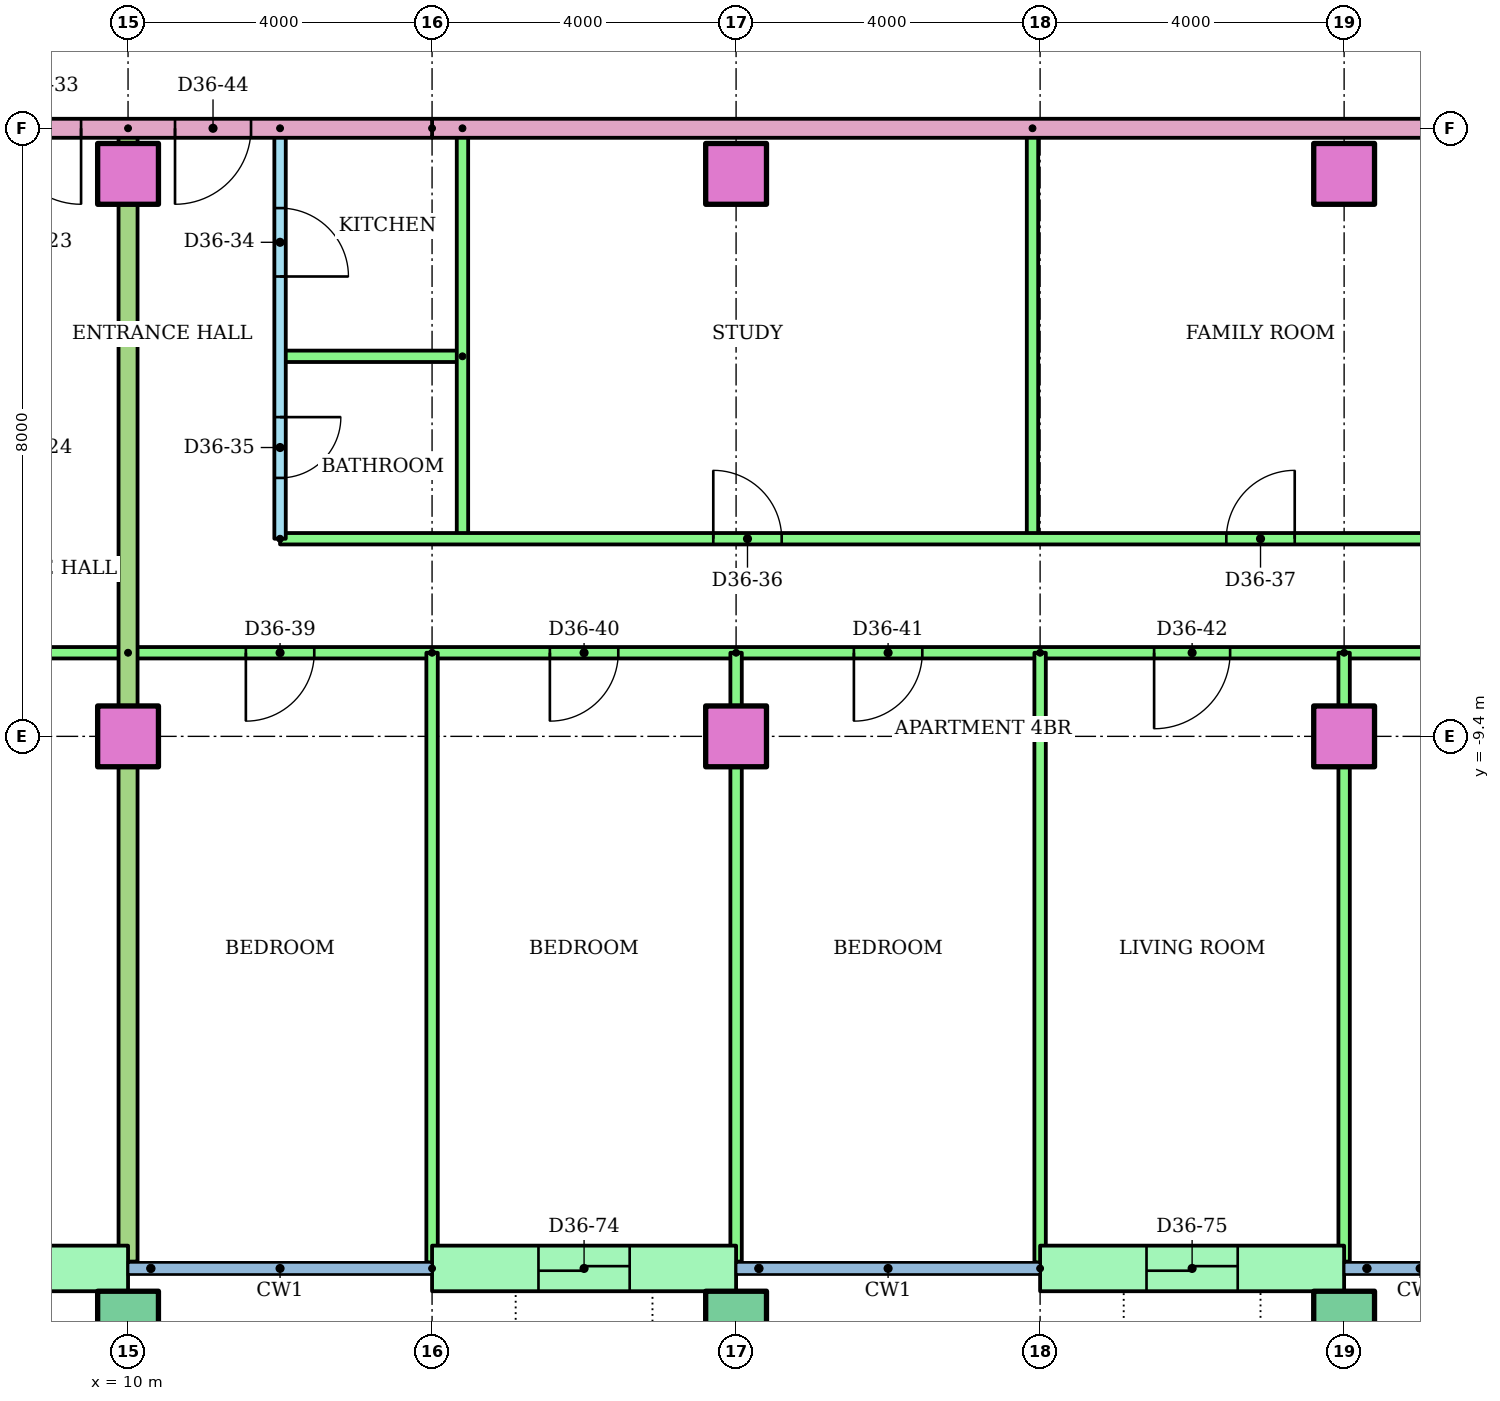
"""IFC4 building model, lengths in metres.
Left out: names, types, materials, properties, quantities, classifications, styles, units other than length and angle.
Written with IfcOpenShell. Run it as: python <this file> out.ifc"""

import sys

from ifc_helpers import new_model, si_unit, direction, frame, frame_2d, origin, origin_2d, place, context, subcontext, project, spatial, rectangle, hollow_rectangle, extrude, element, fill, save


model = new_model("IFC4")
c1 = context("Model", 3, precision=1e-05, world=origin(), true_north=direction((0.0, 1.0)))
c2 = subcontext(c1, "Body", "Model", "MODEL_VIEW")
j1 = project(units=[si_unit("LENGTHUNIT", "METRE"), si_unit("PLANEANGLEUNIT", "RADIAN")], contexts=[c1])
p1 = place(None, origin())
s1 = spatial("IfcSite", under=j1, at=p1, CompositionType="ELEMENT")
p2 = place(p1, origin())
s2 = spatial("IfcBuilding", under=s1, at=p2, CompositionType="ELEMENT")
p3 = place(p2, frame((0.0, 0.0, 139.0)))
s3 = spatial("IfcBuildingStorey", under=s2, at=p3, CompositionType="ELEMENT", Elevation=139.0)
for number, where in (
    (1, (10.0, -17.1, 0.0)),
    (2, (18.0, -17.1, 0.0)),
    (3, (26.0, -17.1, 0.0)),
):
    element("IfcColumn", number, at=place(p3, frame(where)), inside=s3, PredefinedType="COLUMN", context=c2, shape_type="SweptSolid", body=[
        extrude(hollow_rectangle(XDim=0.8, YDim=0.8, WallThickness=0.04, at=origin_2d()), origin(), (0.0, 0.0, 1.0), 3.2),
    ])
for number, where in (
    (4, (10.0, -9.4, 0.0)),
    (5, (18.0, -9.4, 0.0)),
    (6, (26.0, -9.4, 0.0)),
    (7, (10.0, -2.0, 0.0)),
    (8, (18.0, -2.0, 0.0)),
    (9, (26.0, -2.0, 0.0)),
):
    element("IfcColumn", number, at=place(p3, frame(where)), inside=s3, PredefinedType="COLUMN", context=c2, shape_type="SweptSolid", body=[
        extrude(rectangle(XDim=0.8, YDim=0.8, at=origin_2d()), origin(), (0.0, 0.0, 1.0), 3.2),
    ])
p4 = place(p3, frame((6.0, -16.4, 0.0)))
e10 = element("IfcWall", 10, at=p4, inside=s3, PredefinedType="STANDARD", context=c2, shape_type="SweptSolid", body=[
    extrude(rectangle(XDim=4.0, YDim=0.6, at=frame_2d((2.0, 0.0))), origin(), (0.0, 0.0, 1.0), 2.92),
])
p5 = place(p4, frame((1.4, 0.0, 0.0)))
e11 = element("IfcOpeningElement", 11, at=p5, cuts=e10, PredefinedType="OPENING", context=c2, shape_type="SweptSolid", body=[
    extrude(rectangle(XDim=1.2, YDim=2.1, at=frame_2d((0.6, 1.05))), frame((0.0, 0.31, 0.0), z_axis=(0.0, -1.0, 0.0), x_axis=(1.0, 0.0, 0.0)), (0.0, 0.0, 1.0), 0.62),
])
p6 = place(p3, frame((14.0, -16.4, 0.0)))
e12 = element("IfcWall", 12, at=p6, inside=s3, PredefinedType="STANDARD", context=c2, shape_type="SweptSolid", body=[
    extrude(rectangle(XDim=4.0, YDim=0.6, at=frame_2d((2.0, 0.0))), origin(), (0.0, 0.0, 1.0), 2.92),
])
p7 = place(p6, frame((1.4, 0.0, 0.0)))
e13 = element("IfcOpeningElement", 13, at=p7, cuts=e12, PredefinedType="OPENING", context=c2, shape_type="SweptSolid", body=[
    extrude(rectangle(XDim=1.2, YDim=2.1, at=frame_2d((0.6, 1.05))), frame((0.0, 0.31, 0.0), z_axis=(0.0, -1.0, 0.0), x_axis=(1.0, 0.0, 0.0)), (0.0, 0.0, 1.0), 0.62),
])
p8 = place(p3, frame((22.0, -16.4, 0.0)))
e14 = element("IfcWall", 14, at=p8, inside=s3, PredefinedType="STANDARD", context=c2, shape_type="SweptSolid", body=[
    extrude(rectangle(XDim=4.0, YDim=0.6, at=frame_2d((2.0, 0.0))), origin(), (0.0, 0.0, 1.0), 2.92),
])
p9 = place(p8, frame((1.4, 0.0, 0.0)))
e15 = element("IfcOpeningElement", 15, at=p9, cuts=e14, PredefinedType="OPENING", context=c2, shape_type="SweptSolid", body=[
    extrude(rectangle(XDim=1.2, YDim=2.1, at=frame_2d((0.6, 1.05))), frame((0.0, 0.31, 0.0), z_axis=(0.0, -1.0, 0.0), x_axis=(1.0, 0.0, 0.0)), (0.0, 0.0, 1.0), 0.62),
])
p10 = place(p3, frame((10.0, -8.3, 0.0), z_axis=(0.0, 0.0, 1.0), x_axis=(-1.0, 0.0, 0.0)))
e16 = element("IfcWall", 16, at=p10, inside=s3, PredefinedType="PARTITIONING", context=c2, shape_type="SweptSolid", body=[
    extrude(rectangle(XDim=24.0, YDim=0.15, at=frame_2d((12.0, 0.0))), origin(), (0.0, 0.0, 1.0), 2.4),
])
p11 = place(p10, frame((19.5, 0.0, 0.0)))
e17 = element("IfcOpeningElement", 17, at=p11, cuts=e16, PredefinedType="OPENING", context=c2, shape_type="SweptSolid", body=[
    extrude(rectangle(XDim=1.0, YDim=2.1, at=frame_2d((0.5, 1.05))), frame((0.0, 0.085, 0.0), z_axis=(0.0, -1.0, 0.0), x_axis=(1.0, 0.0, 0.0)), (0.0, 0.0, 1.0), 0.17),
])
p12 = place(p10, frame((13.55, 0.0, 0.0)))
e18 = element("IfcOpeningElement", 18, at=p12, cuts=e16, PredefinedType="OPENING", context=c2, shape_type="SweptSolid", body=[
    extrude(rectangle(XDim=0.9, YDim=2.1, at=frame_2d((0.45, 1.05))), frame((0.0, 0.085, 0.0), z_axis=(0.0, -1.0, 0.0), x_axis=(1.0, 0.0, 0.0)), (0.0, 0.0, 1.0), 0.17),
])
p13 = place(p10, frame((9.55, 0.0, 0.0)))
e19 = element("IfcOpeningElement", 19, at=p13, cuts=e16, PredefinedType="OPENING", context=c2, shape_type="SweptSolid", body=[
    extrude(rectangle(XDim=0.9, YDim=2.1, at=frame_2d((0.45, 1.05))), frame((0.0, 0.085, 0.0), z_axis=(0.0, -1.0, 0.0), x_axis=(1.0, 0.0, 0.0)), (0.0, 0.0, 1.0), 0.17),
])
p14 = place(p10, frame((5.55, 0.0, 0.0)))
e20 = element("IfcOpeningElement", 20, at=p14, cuts=e16, PredefinedType="OPENING", context=c2, shape_type="SweptSolid", body=[
    extrude(rectangle(XDim=0.9, YDim=2.1, at=frame_2d((0.45, 1.05))), frame((0.0, 0.085, 0.0), z_axis=(0.0, -1.0, 0.0), x_axis=(1.0, 0.0, 0.0)), (0.0, 0.0, 1.0), 0.17),
])
p15 = place(p10, frame((1.55, 0.0, 0.0)))
e21 = element("IfcOpeningElement", 21, at=p15, cuts=e16, PredefinedType="OPENING", context=c2, shape_type="SweptSolid", body=[
    extrude(rectangle(XDim=0.9, YDim=2.1, at=frame_2d((0.45, 1.05))), frame((0.0, 0.085, 0.0), z_axis=(0.0, -1.0, 0.0), x_axis=(1.0, 0.0, 0.0)), (0.0, 0.0, 1.0), 0.17),
])
p16 = place(p3, frame((12.0, -1.4, 0.0), z_axis=(0.0, 0.0, 1.0), x_axis=(0.0, -1.0, 0.0)))
e22 = element("IfcWall", 22, at=p16, inside=s3, PredefinedType="PARTITIONING", context=c2, shape_type="SweptSolid", body=[
    extrude(rectangle(XDim=5.4, YDim=0.15, at=frame_2d((2.7, 0.0))), origin(), (0.0, 0.0, 1.0), 2.4),
])
p17 = place(p16, frame((1.05, 0.0, 0.0)))
e23 = element("IfcOpeningElement", 23, at=p17, cuts=e22, PredefinedType="OPENING", context=c2, shape_type="SweptSolid", body=[
    extrude(rectangle(XDim=0.9, YDim=2.1, at=frame_2d((0.45, 1.05))), frame((0.0, 0.085, 0.0), z_axis=(0.0, -1.0, 0.0), x_axis=(1.0, 0.0, 0.0)), (0.0, 0.0, 1.0), 0.17),
])
p18 = place(p16, frame((3.8, 0.0, 0.0)))
e24 = element("IfcOpeningElement", 24, at=p18, cuts=e22, PredefinedType="OPENING", context=c2, shape_type="SweptSolid", body=[
    extrude(rectangle(XDim=0.8, YDim=2.1, at=frame_2d((0.4, 1.05))), frame((0.0, 0.085, 0.0), z_axis=(0.0, -1.0, 0.0), x_axis=(1.0, 0.0, 0.0)), (0.0, 0.0, 1.0), 0.17),
])
p19 = place(p3, frame((14.4, -4.4, 0.0), z_axis=(0.0, 0.0, 1.0), x_axis=(-1.0, 0.0, 0.0)))
e25 = element("IfcWall", 25, at=p19, inside=s3, PredefinedType="PARTITIONING", context=c2, shape_type="SweptSolid", body=[
    extrude(rectangle(XDim=2.4, YDim=0.15, at=frame_2d((1.2, 0.0))), origin(), (0.0, 0.0, 1.0), 2.4),
])
for number, where, z_axis, x_axis in (
    (26, (14.4, -1.4, 0.0), (0.0, 0.0, 1.0), (0.0, -1.0, 0.0)),
    (27, (21.9, -1.4, 0.0), (0.0, 0.0, 1.0), (0.0, -1.0, 0.0)),
):
    element("IfcWall", number, at=place(p3, frame(where, z_axis=z_axis, x_axis=x_axis)), inside=s3, PredefinedType="PARTITIONING", context=c2, shape_type="SweptSolid", body=[
        extrude(rectangle(XDim=5.4, YDim=0.15, at=frame_2d((2.7, 0.0))), origin(), (0.0, 0.0, 1.0), 2.4),
    ])
p20 = place(p3, frame((12.0, -6.8, 0.0)))
e28 = element("IfcWall", 28, at=p20, inside=s3, PredefinedType="PARTITIONING", context=c2, shape_type="SweptSolid", body=[
    extrude(rectangle(XDim=20.72, YDim=0.15, at=frame_2d((10.36, 0.0))), origin(), (0.0, 0.0, 1.0), 2.4),
])
p21 = place(p20, frame((5.7, 0.0, 0.0)))
e29 = element("IfcOpeningElement", 29, at=p21, cuts=e28, PredefinedType="OPENING", context=c2, shape_type="SweptSolid", body=[
    extrude(rectangle(XDim=0.9, YDim=2.1, at=frame_2d((0.45, 1.05))), frame((0.0, 0.085, 0.0), z_axis=(0.0, -1.0, 0.0), x_axis=(1.0, 0.0, 0.0)), (0.0, 0.0, 1.0), 0.17),
])
p22 = place(p20, frame((12.45, 0.0, 0.0)))
e30 = element("IfcOpeningElement", 30, at=p22, cuts=e28, PredefinedType="OPENING", context=c2, shape_type="SweptSolid", body=[
    extrude(rectangle(XDim=0.9, YDim=2.1, at=frame_2d((0.45, 1.05))), frame((0.0, 0.085, 0.0), z_axis=(0.0, -1.0, 0.0), x_axis=(1.0, 0.0, 0.0)), (0.0, 0.0, 1.0), 0.17),
])
p23 = place(p20, frame((17.75, 0.0, 0.0)))
e31 = element("IfcOpeningElement", 31, at=p23, cuts=e28, PredefinedType="OPENING", context=c2, shape_type="SweptSolid", body=[
    extrude(rectangle(XDim=0.9, YDim=2.1, at=frame_2d((0.45, 1.05))), frame((0.0, 0.085, 0.0), z_axis=(0.0, -1.0, 0.0), x_axis=(1.0, 0.0, 0.0)), (0.0, 0.0, 1.0), 0.17),
])
p24 = place(p3, frame((32.72, -8.3, 0.0), z_axis=(0.0, 0.0, 1.0), x_axis=(-1.0, 0.0, 0.0)))
e32 = element("IfcWall", 32, at=p24, inside=s3, PredefinedType="PARTITIONING", context=c2, shape_type="SweptSolid", body=[
    extrude(rectangle(XDim=22.72, YDim=0.15, at=frame_2d((11.36, 0.0))), origin(), (0.0, 0.0, 1.0), 2.4),
])
p25 = place(p24, frame((20.27, 0.0, 0.0)))
e33 = element("IfcOpeningElement", 33, at=p25, cuts=e32, PredefinedType="OPENING", context=c2, shape_type="SweptSolid", body=[
    extrude(rectangle(XDim=0.9, YDim=2.1, at=frame_2d((0.45, 1.05))), frame((0.0, 0.085, 0.0), z_axis=(0.0, -1.0, 0.0), x_axis=(1.0, 0.0, 0.0)), (0.0, 0.0, 1.0), 0.17),
])
p26 = place(p24, frame((16.27, 0.0, 0.0)))
e34 = element("IfcOpeningElement", 34, at=p26, cuts=e32, PredefinedType="OPENING", context=c2, shape_type="SweptSolid", body=[
    extrude(rectangle(XDim=0.9, YDim=2.1, at=frame_2d((0.45, 1.05))), frame((0.0, 0.085, 0.0), z_axis=(0.0, -1.0, 0.0), x_axis=(1.0, 0.0, 0.0)), (0.0, 0.0, 1.0), 0.17),
])
p27 = place(p24, frame((12.27, 0.0, 0.0)))
e35 = element("IfcOpeningElement", 35, at=p27, cuts=e32, PredefinedType="OPENING", context=c2, shape_type="SweptSolid", body=[
    extrude(rectangle(XDim=0.9, YDim=2.1, at=frame_2d((0.45, 1.05))), frame((0.0, 0.085, 0.0), z_axis=(0.0, -1.0, 0.0), x_axis=(1.0, 0.0, 0.0)), (0.0, 0.0, 1.0), 0.17),
])
p28 = place(p24, frame((8.22, 0.0, 0.0)))
e36 = element("IfcOpeningElement", 36, at=p28, cuts=e32, PredefinedType="OPENING", context=c2, shape_type="SweptSolid", body=[
    extrude(rectangle(XDim=1.0, YDim=2.1, at=frame_2d((0.5, 1.05))), frame((0.0, 0.085, 0.0), z_axis=(0.0, -1.0, 0.0), x_axis=(1.0, 0.0, 0.0)), (0.0, 0.0, 1.0), 0.17),
])
p29 = place(p24, frame((3.02, 0.0, 0.0)))
e37 = element("IfcOpeningElement", 37, at=p29, cuts=e32, PredefinedType="OPENING", context=c2, shape_type="SweptSolid", body=[
    extrude(rectangle(XDim=0.9, YDim=2.1, at=frame_2d((0.45, 1.05))), frame((0.0, 0.085, 0.0), z_axis=(0.0, -1.0, 0.0), x_axis=(1.0, 0.0, 0.0)), (0.0, 0.0, 1.0), 0.17),
])
p30 = place(p3, frame((14.0, -8.3, 0.0), z_axis=(0.0, 0.0, 1.0), x_axis=(0.0, -1.0, 0.0)))
e38 = element("IfcWall", 38, at=p30, inside=s3, PredefinedType="PARTITIONING", context=c2, shape_type="SweptSolid", body=[
    extrude(rectangle(XDim=8.021, YDim=0.15, at=frame_2d((4.01, 0.0))), origin(), (0.0, 0.0, 1.0), 2.4),
])
p31 = place(p3, frame((18.0, -8.3, 0.0), z_axis=(0.0, 0.0, 1.0), x_axis=(0.0, -1.0, 0.0)))
e39 = element("IfcWall", 39, at=p31, inside=s3, PredefinedType="PARTITIONING", context=c2, shape_type="SweptSolid", body=[
    extrude(rectangle(XDim=8.01, YDim=0.15, at=frame_2d((4.005, 0.0))), origin(), (0.0, 0.0, 1.0), 2.4),
])
p32 = place(p3, frame((22.0, -8.3, 0.0), z_axis=(0.0, 0.0, 1.0), x_axis=(0.0, -1.0, 0.0)))
e40 = element("IfcWall", 40, at=p32, inside=s3, PredefinedType="PARTITIONING", context=c2, shape_type="SweptSolid", body=[
    extrude(rectangle(XDim=8.021, YDim=0.15, at=frame_2d((4.01, 0.0))), origin(), (0.0, 0.0, 1.0), 2.4),
])
p33 = place(p3, frame((26.0, -8.3, 0.0), z_axis=(0.0, 0.0, 1.0), x_axis=(0.0, -1.0, 0.0)))
e41 = element("IfcWall", 41, at=p33, inside=s3, PredefinedType="PARTITIONING", context=c2, shape_type="SweptSolid", body=[
    extrude(rectangle(XDim=8.01, YDim=0.15, at=frame_2d((4.005, 0.0))), origin(), (0.0, 0.0, 1.0), 2.4),
])
p34 = place(p3, frame((10.0, -1.4, 0.0), z_axis=(0.0, 0.0, 1.0), x_axis=(0.0, -1.0, 0.0)))
e42 = element("IfcWall", 42, at=p34, inside=s3, PredefinedType="PARTITIONING", context=c2, shape_type="SweptSolid", body=[
    extrude(rectangle(XDim=14.91, YDim=0.25, at=frame_2d((7.455, 0.0))), origin(), (0.0, 0.0, 1.0), 2.4),
])
p35 = place(p3, frame((29.0, -1.4, 0.0), z_axis=(0.0, 0.0, 1.0), x_axis=(-1.0, 0.0, 0.0)))
e43 = element("IfcWall", 43, at=p35, inside=s3, PredefinedType="PARTITIONING", context=c2, shape_type="SweptSolid", body=[
    extrude(rectangle(XDim=15.0, YDim=0.25, at=frame_2d((7.5, 0.0))), origin(), (0.0, 0.0, 1.0), 2.4),
])
p36 = place(p3, frame((14.0, -1.4, 0.0), z_axis=(0.0, 0.0, 1.0), x_axis=(-1.0, 0.0, 0.0)))
e44 = element("IfcWall", 44, at=p36, inside=s3, PredefinedType="PARTITIONING", context=c2, shape_type="SweptSolid", body=[
    extrude(rectangle(XDim=28.0, YDim=0.25, at=frame_2d((14.0, 0.0))), origin(), (0.0, 0.0, 1.0), 2.4),
])
p37 = place(p36, frame((4.618, 0.0, 0.0)))
e45 = element("IfcOpeningElement", 45, at=p37, cuts=e44, PredefinedType="OPENING", context=c2, shape_type="SweptSolid", body=[
    extrude(rectangle(XDim=1.0, YDim=2.1, at=frame_2d((0.5, 1.05))), frame((0.0, 0.135, 0.0), z_axis=(0.0, -1.0, 0.0), x_axis=(1.0, 0.0, 0.0)), (0.0, 0.0, 1.0), 0.27),
])
p38 = place(p36, frame((2.382, 0.0, 0.0)))
e46 = element("IfcOpeningElement", 46, at=p38, cuts=e44, PredefinedType="OPENING", context=c2, shape_type="SweptSolid", body=[
    extrude(rectangle(XDim=1.0, YDim=2.1, at=frame_2d((0.5, 1.05))), frame((0.0, 0.135, 0.0), z_axis=(0.0, -1.0, 0.0), x_axis=(1.0, 0.0, 0.0)), (0.0, 0.0, 1.0), 0.27),
])
p39 = place(p37, origin())
e47 = element("IfcDoor", 47, at=p39, inside=s3, OperationType="SINGLE_SWING_LEFT", PredefinedType="DOOR", context=c2, shape_type="SweptSolid", body=[
    extrude(rectangle(XDim=1.0, YDim=2.1, at=frame_2d((0.5, 1.05))), frame((0.0, 0.025, 0.0), z_axis=(0.0, -1.0, 0.0), x_axis=(1.0, 0.0, 0.0)), (0.0, 0.0, 1.0), 0.05),
])
fill(e45, e47)
p40 = place(p17, origin())
e48 = element("IfcDoor", 48, at=p40, inside=s3, OperationType="SINGLE_SWING_RIGHT", PredefinedType="DOOR", context=c2, shape_type="SweptSolid", body=[
    extrude(rectangle(XDim=0.9, YDim=2.1, at=frame_2d((0.45, 1.05))), frame((0.0, 0.025, 0.0), z_axis=(0.0, -1.0, 0.0), x_axis=(1.0, 0.0, 0.0)), (0.0, 0.0, 1.0), 0.05),
])
fill(e23, e48)
p41 = place(p18, origin())
e49 = element("IfcDoor", 49, at=p41, inside=s3, OperationType="SINGLE_SWING_LEFT", PredefinedType="DOOR", context=c2, shape_type="SweptSolid", body=[
    extrude(rectangle(XDim=0.8, YDim=2.1, at=frame_2d((0.4, 1.05))), frame((0.0, 0.025, 0.0), z_axis=(0.0, -1.0, 0.0), x_axis=(1.0, 0.0, 0.0)), (0.0, 0.0, 1.0), 0.05),
])
fill(e24, e49)
p42 = place(p21, origin())
e50 = element("IfcDoor", 50, at=p42, inside=s3, OperationType="SINGLE_SWING_LEFT", PredefinedType="DOOR", context=c2, shape_type="SweptSolid", body=[
    extrude(rectangle(XDim=0.9, YDim=2.1, at=frame_2d((0.45, 1.05))), frame((0.0, 0.025, 0.0), z_axis=(0.0, -1.0, 0.0), x_axis=(1.0, 0.0, 0.0)), (0.0, 0.0, 1.0), 0.05),
])
fill(e29, e50)
p43 = place(p22, origin())
e51 = element("IfcDoor", 51, at=p43, inside=s3, OperationType="SINGLE_SWING_RIGHT", PredefinedType="DOOR", context=c2, shape_type="SweptSolid", body=[
    extrude(rectangle(XDim=0.9, YDim=2.1, at=frame_2d((0.45, 1.05))), frame((0.0, 0.025, 0.0), z_axis=(0.0, -1.0, 0.0), x_axis=(1.0, 0.0, 0.0)), (0.0, 0.0, 1.0), 0.05),
])
fill(e30, e51)
p44 = place(p25, origin())
e52 = element("IfcDoor", 52, at=p44, inside=s3, OperationType="SINGLE_SWING_RIGHT", PredefinedType="DOOR", context=c2, shape_type="SweptSolid", body=[
    extrude(rectangle(XDim=0.9, YDim=2.1, at=frame_2d((0.45, 1.05))), frame((0.0, 0.025, 0.0), z_axis=(0.0, -1.0, 0.0), x_axis=(1.0, 0.0, 0.0)), (0.0, 0.0, 1.0), 0.05),
])
fill(e33, e52)
p45 = place(p26, origin())
e53 = element("IfcDoor", 53, at=p45, inside=s3, OperationType="SINGLE_SWING_RIGHT", PredefinedType="DOOR", context=c2, shape_type="SweptSolid", body=[
    extrude(rectangle(XDim=0.9, YDim=2.1, at=frame_2d((0.45, 1.05))), frame((0.0, 0.025, 0.0), z_axis=(0.0, -1.0, 0.0), x_axis=(1.0, 0.0, 0.0)), (0.0, 0.0, 1.0), 0.05),
])
fill(e34, e53)
p46 = place(p27, origin())
e54 = element("IfcDoor", 54, at=p46, inside=s3, OperationType="SINGLE_SWING_RIGHT", PredefinedType="DOOR", context=c2, shape_type="SweptSolid", body=[
    extrude(rectangle(XDim=0.9, YDim=2.1, at=frame_2d((0.45, 1.05))), frame((0.0, 0.025, 0.0), z_axis=(0.0, -1.0, 0.0), x_axis=(1.0, 0.0, 0.0)), (0.0, 0.0, 1.0), 0.05),
])
fill(e35, e54)
p47 = place(p28, origin())
e55 = element("IfcDoor", 55, at=p47, inside=s3, OperationType="SINGLE_SWING_RIGHT", PredefinedType="DOOR", context=c2, shape_type="SweptSolid", body=[
    extrude(rectangle(XDim=1.0, YDim=2.1, at=frame_2d((0.5, 1.05))), frame((0.0, 0.025, 0.0), z_axis=(0.0, -1.0, 0.0), x_axis=(1.0, 0.0, 0.0)), (0.0, 0.0, 1.0), 0.05),
])
fill(e36, e55)
p48 = place(p38, origin())
e56 = element("IfcDoor", 56, at=p48, inside=s3, OperationType="SINGLE_SWING_RIGHT", PredefinedType="DOOR", context=c2, shape_type="SweptSolid", body=[
    extrude(rectangle(XDim=1.0, YDim=2.1, at=frame_2d((0.5, 1.05))), frame((0.0, 0.025, 0.0), z_axis=(0.0, -1.0, 0.0), x_axis=(1.0, 0.0, 0.0)), (0.0, 0.0, 1.0), 0.05),
])
fill(e46, e56)
p49 = place(p7, origin())
e57 = element("IfcDoor", 57, at=p49, inside=s3, OperationType="SLIDING_TO_LEFT", PredefinedType="DOOR", context=c2, shape_type="SweptSolid", body=[
    extrude(rectangle(XDim=1.2, YDim=2.1, at=frame_2d((0.6, 1.05))), frame((0.0, 0.025, 0.0), z_axis=(0.0, -1.0, 0.0), x_axis=(1.0, 0.0, 0.0)), (0.0, 0.0, 1.0), 0.05),
])
fill(e13, e57)
p50 = place(p9, origin())
e58 = element("IfcDoor", 58, at=p50, inside=s3, OperationType="SLIDING_TO_LEFT", PredefinedType="DOOR", context=c2, shape_type="SweptSolid", body=[
    extrude(rectangle(XDim=1.2, YDim=2.1, at=frame_2d((0.6, 1.05))), frame((0.0, 0.025, 0.0), z_axis=(0.0, -1.0, 0.0), x_axis=(1.0, 0.0, 0.0)), (0.0, 0.0, 1.0), 0.05),
])
fill(e15, e58)
save(model, sys.argv[1])
